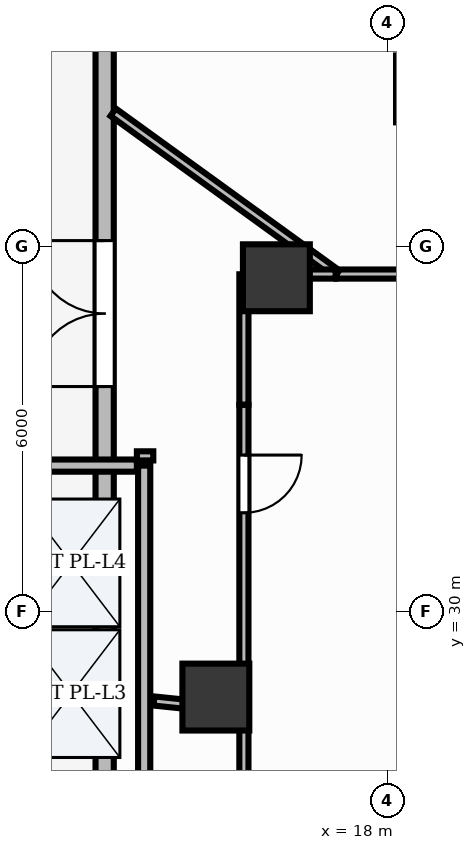
"""IFC4 building model, lengths in metres.
Left out: names, types, materials, properties, quantities, classifications, styles, units other than length and angle.
Written with IfcOpenShell. Run it as: python <this file> out.ifc"""

import sys

from ifc_helpers import new_model, si_unit, direction, frame, frame_2d, origin, origin_2d, place, context, subcontext, project, spatial, rectangle, extrude, element, fill, save


model = new_model("IFC4")
c1 = context("Model", 3, precision=1e-05, world=origin(), true_north=direction((0.0, 1.0)))
c2 = subcontext(c1, "Body", "Model", "MODEL_VIEW")
j1 = project(units=[si_unit("LENGTHUNIT", "METRE"), si_unit("PLANEANGLEUNIT", "RADIAN")], contexts=[c1])
p1 = place(None, origin())
s1 = spatial("IfcSite", under=j1, at=p1, CompositionType="ELEMENT")
p2 = place(p1, origin())
s2 = spatial("IfcBuilding", under=s1, at=p2, CompositionType="ELEMENT")
p3 = place(p2, origin())
s3 = spatial("IfcBuildingStorey", under=s2, at=p3, CompositionType="ELEMENT", Elevation=0.0)
for number, where, z_axis, x_axis in (
    (1, (18.692, 38.595, -0.0), (0.0, 0.0, 1.0), (1.0, 0.0, 0.0)),
    (2, (16.174, 35.489, -0.0), (0.0, 0.0, 1.0), (1.0, 0.0, 0.0)),
    (3, (15.179, 28.594, -0.0), (0.0, 0.0, 1.0), (1.0, 0.0, 0.0)),
):
    element("IfcColumn", number, at=place(p3, frame(where, z_axis=z_axis, x_axis=x_axis)), inside=s3, PredefinedType="COLUMN", context=c2, shape_type="SweptSolid", body=[
        extrude(rectangle(XDim=1.1, YDim=1.1, at=origin_2d()), origin(), (0.0, 0.0, 1.0), 5.101),
    ])
p4 = place(p3, frame((13.35, 12.05, 0.0), z_axis=(0.0, 0.0, 1.0), x_axis=(0.0, 1.0, 0.0)))
e4 = element("IfcWall", 4, at=p4, inside=s3, PredefinedType="STANDARD", context=c2, shape_type="SweptSolid", body=[
    extrude(rectangle(XDim=29.9, YDim=0.3, at=frame_2d((14.95, 0.0))), origin(), (0.0, 0.0, 1.0), 5.1),
])
p5 = place(p4, frame((5.65, 0.0, 0.0)))
e5 = element("IfcOpeningElement", 5, at=p5, cuts=e4, PredefinedType="OPENING", context=c2, shape_type="SweptSolid", body=[
    extrude(rectangle(XDim=2.4, YDim=2.7, at=frame_2d((1.2, 1.35))), frame((0.0, 0.165, 0.0), z_axis=(0.0, -1.0, 0.0), x_axis=(1.0, 0.0, 0.0)), (0.0, 0.0, 1.0), 0.33),
])
p6 = place(p4, frame((21.65, 0.0, 0.0)))
e6 = element("IfcOpeningElement", 6, at=p6, cuts=e4, PredefinedType="OPENING", context=c2, shape_type="SweptSolid", body=[
    extrude(rectangle(XDim=2.4, YDim=2.7, at=frame_2d((1.2, 1.35))), frame((0.0, 0.165, 0.0), z_axis=(0.0, -1.0, 0.0), x_axis=(1.0, 0.0, 0.0)), (0.0, 0.0, 1.0), 0.33),
])
p7 = place(p3, frame((14.0, 21.6, 0.0), z_axis=(0.0, 0.0, 1.0), x_axis=(0.0, 1.0, 0.0)))
e7 = element("IfcWall", 7, at=p7, inside=s3, PredefinedType="PARTITIONING", context=c2, shape_type="SweptSolid", body=[
    extrude(rectangle(XDim=10.8, YDim=0.2, at=frame_2d((5.4, 0.0))), origin(), (0.0, 0.0, 1.0), 4.11),
])
p8 = place(p3, frame((11.72, 32.4, 0.0), z_axis=(0.0, 0.0, 1.0), x_axis=(1.0, 0.0, 0.0)))
e8 = element("IfcWall", 8, at=p8, inside=s3, PredefinedType="PARTITIONING", context=c2, shape_type="SweptSolid", body=[
    extrude(rectangle(XDim=2.16, YDim=0.2, at=frame_2d((1.08, 0.0))), origin(), (0.0, 0.0, 1.0), 4.11),
])
p9 = place(p3, frame((15.64, 28.376, 0.0), z_axis=(0.0, 0.0, 1.0), x_axis=(0.0, -1.0, 0.0)))
e9 = element("IfcWall", 9, at=p9, inside=s3, PredefinedType="PARTITIONING", context=c2, shape_type="SweptSolid", body=[
    extrude(rectangle(XDim=6.924, YDim=0.15, at=frame_2d((3.462, 0.0))), origin(), (0.0, 0.0, 1.0), 4.11),
])
p10 = place(p9, frame((3.475, 0.0, 0.0)))
e10 = element("IfcOpeningElement", 10, at=p10, cuts=e9, PredefinedType="OPENING", context=c2, shape_type="SweptSolid", body=[
    extrude(rectangle(XDim=0.95, YDim=2.15, at=frame_2d((0.475, 1.075))), frame((0.0, 0.09, 0.0), z_axis=(0.0, -1.0, 0.0), x_axis=(1.0, 0.0, 0.0)), (0.0, 0.0, 1.0), 0.18),
])
p11 = place(p3, frame((15.64, 33.398, 0.0), z_axis=(0.0, 0.0, 1.0), x_axis=(0.0, -1.0, 0.0)))
e11 = element("IfcWall", 11, at=p11, inside=s3, PredefinedType="PARTITIONING", context=c2, shape_type="SweptSolid", body=[
    extrude(rectangle(XDim=5.012, YDim=0.15, at=frame_2d((2.506, 0.0))), origin(), (0.0, 0.0, 1.0), 4.11),
])
p12 = place(p11, frame((0.825, 0.0, 0.0)))
e12 = element("IfcOpeningElement", 12, at=p12, cuts=e11, PredefinedType="OPENING", context=c2, shape_type="SweptSolid", body=[
    extrude(rectangle(XDim=0.95, YDim=2.15, at=frame_2d((0.475, 1.075))), frame((0.0, 0.09, 0.0), z_axis=(0.0, -1.0, 0.0), x_axis=(1.0, 0.0, 0.0)), (0.0, 0.0, 1.0), 0.18),
])
p13 = place(p3, frame((14.16, 28.529, 0.0), z_axis=(0.0, 0.0, 1.0), x_axis=(0.994708578353, -0.102736771168, 0.0)))
e13 = element("IfcWall", 13, at=p13, inside=s3, PredefinedType="PARTITIONING", context=c2, shape_type="SweptSolid", body=[
    extrude(rectangle(XDim=1.488, YDim=0.15, at=frame_2d((0.744, 0.0))), origin(), (0.0, 0.0, 1.0), 4.11),
])
p14 = place(p3, frame((18.948, 35.55, 0.0), z_axis=(0.0, 0.0, 1.0), x_axis=(-1.0, 0.0, 0.0)))
e14 = element("IfcWall", 14, at=p14, inside=s3, PredefinedType="PARTITIONING", context=c2, shape_type="SweptSolid", body=[
    extrude(rectangle(XDim=1.782, YDim=0.15, at=frame_2d((0.891, 0.0))), origin(), (0.0, 0.0, 1.0), 4.11),
])
p15 = place(p3, frame((17.166, 35.55, 0.0), z_axis=(0.0, 0.0, 1.0), x_axis=(-0.81004170459, 0.586372268125, 0.0)))
e15 = element("IfcWall", 15, at=p15, inside=s3, PredefinedType="PARTITIONING", context=c2, shape_type="SweptSolid", body=[
    extrude(rectangle(XDim=4.537, YDim=0.15, at=frame_2d((2.269, 0.0))), origin(), (0.0, 0.0, 1.0), 4.11),
])
p16 = place(p3, frame((15.64, 35.546, 0.0), z_axis=(0.0, 0.0, 1.0), x_axis=(0.0, -1.0, 0.0)))
e16 = element("IfcWall", 16, at=p16, inside=s3, PredefinedType="PARTITIONING", context=c2, shape_type="SweptSolid", body=[
    extrude(rectangle(XDim=2.144, YDim=0.15, at=frame_2d((1.072, 0.0))), origin(), (0.0, 0.0, 1.0), 4.11),
])
p17 = place(p3, frame((14.15, 32.56, 0.0), z_axis=(0.0, 0.0, 1.0), x_axis=(-1.0, 0.0, 0.0)))
e17 = element("IfcWall", 17, at=p17, inside=s3, PredefinedType="PARTITIONING", context=c2, shape_type="SweptSolid", body=[
    extrude(rectangle(XDim=0.27, YDim=0.15, at=frame_2d((0.135, 0.0))), origin(), (0.0, 0.0, 1.0), 4.11),
])
p18 = place(p3, frame((17.149, 35.55, 0.0), z_axis=(0.0, 0.0, 1.0), x_axis=(-1.0, 0.0, 0.0)))
e18 = element("IfcWall", 18, at=p18, inside=s3, PredefinedType="PARTITIONING", context=c2, shape_type="SweptSolid", body=[
    extrude(rectangle(XDim=1.505, YDim=0.15, at=frame_2d((0.752, 0.0))), origin(), (0.0, 0.0, 1.0), 4.11),
])
p19 = place(p6, origin())
e19 = element("IfcDoor", 19, at=p19, inside=s3, OperationType="DOUBLE_DOOR_SINGLE_SWING", PredefinedType="DOOR", context=c2, shape_type="SweptSolid", body=[
    extrude(rectangle(XDim=2.4, YDim=2.7, at=frame_2d((1.2, 1.35))), frame((0.0, 0.025, 0.0), z_axis=(0.0, -1.0, 0.0), x_axis=(1.0, 0.0, 0.0)), (0.0, 0.0, 1.0), 0.05),
])
fill(e6, e19)
p20 = place(p12, origin())
e20 = element("IfcDoor", 20, at=p20, inside=s3, OperationType="SINGLE_SWING_LEFT", PredefinedType="DOOR", context=c2, shape_type="SweptSolid", body=[
    extrude(rectangle(XDim=0.95, YDim=2.15, at=frame_2d((0.475, 1.075))), frame((0.0, 0.025, 0.0), z_axis=(0.0, -1.0, 0.0), x_axis=(1.0, 0.0, 0.0)), (0.0, 0.0, 1.0), 0.05),
])
fill(e12, e20)
save(model, sys.argv[1])
